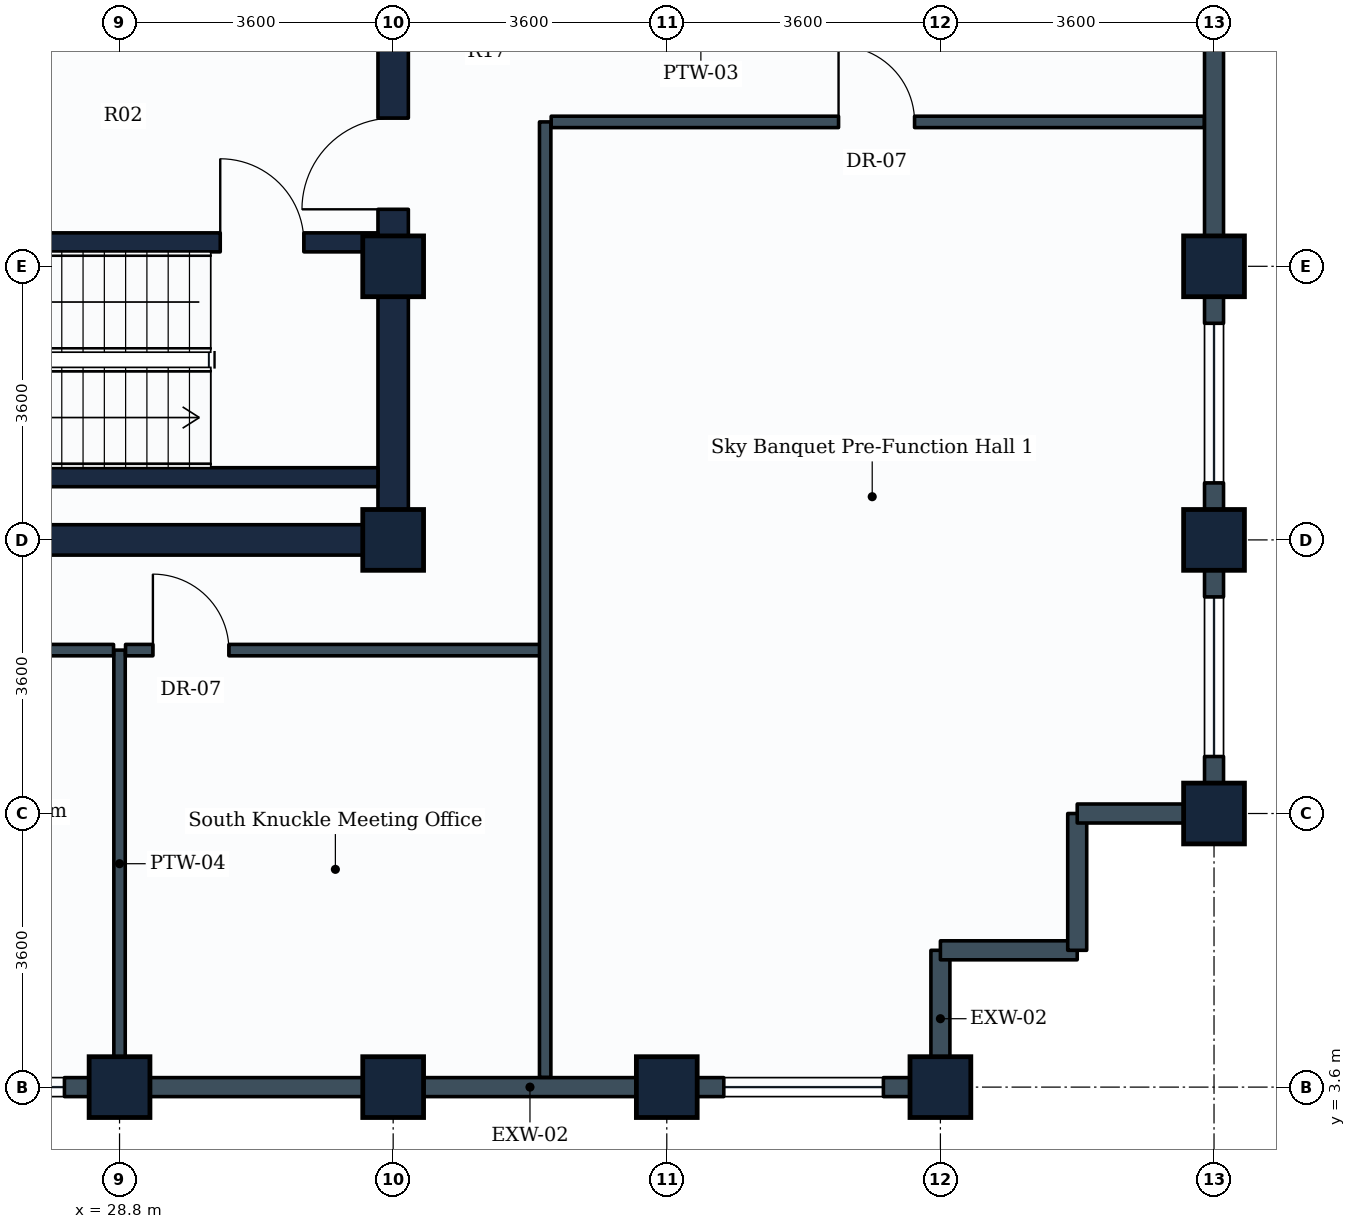
"""IFC4 building model, lengths in metres.
Left out: names, types, materials, properties, quantities, classifications, styles, units other than length and angle.
Written with IfcOpenShell. Run it as: python <this file> out.ifc"""

import sys

from ifc_helpers import new_model, si_unit, direction, frame, frame_2d, origin, origin_2d, place, context, subcontext, project, spatial, rectangle, extrude, element, fill, save


model = new_model("IFC4")
c1 = context("Model", 3, precision=1e-05, world=origin(), true_north=direction((0.0, 1.0)))
c2 = subcontext(c1, "Body", "Model", "MODEL_VIEW")
j1 = project(units=[si_unit("LENGTHUNIT", "METRE"), si_unit("PLANEANGLEUNIT", "RADIAN")], contexts=[c1])
p1 = place(None, origin())
s1 = spatial("IfcSite", under=j1, at=p1, CompositionType="ELEMENT")
p2 = place(p1, origin())
s2 = spatial("IfcBuilding", under=s1, at=p2, CompositionType="ELEMENT")
p3 = place(p2, frame((0.0, 0.0, 246.2)))
s3 = spatial("IfcBuildingStorey", under=s2, at=p3, CompositionType="ELEMENT", Elevation=246.2)
for number, where, z_axis, x_axis in (
    (1, (28.8, 3.6, 0.0), (0.0, 0.0, 1.0), (1.0, 0.0, 0.0)),
    (2, (32.4, 3.6, 0.0), (0.0, 0.0, 1.0), (1.0, 0.0, 0.0)),
    (3, (32.4, 10.8, 0.0), (0.0, 0.0, 1.0), (1.0, 0.0, 0.0)),
    (4, (32.4, 14.4, 0.0), (0.0, 0.0, 1.0), (1.0, 0.0, 0.0)),
    (5, (36.0, 3.6, 0.0), (0.0, 0.0, 1.0), (1.0, 0.0, 0.0)),
    (6, (39.6, 3.6, 0.0), (0.0, 0.0, 1.0), (1.0, 0.0, 0.0)),
    (7, (43.2, 7.2, 0.0), (0.0, 0.0, 1.0), (1.0, 0.0, 0.0)),
    (8, (43.2, 10.8, 0.0), (0.0, 0.0, 1.0), (0.0, 1.0, 0.0)),
    (9, (43.2, 14.4, 0.0), (0.0, 0.0, 1.0), (0.0, 1.0, 0.0)),
):
    element("IfcColumn", number, at=place(p3, frame(where, z_axis=z_axis, x_axis=x_axis)), inside=s3, PredefinedType="COLUMN", context=c2, shape_type="SweptSolid", body=[
        extrude(rectangle(XDim=0.8, YDim=0.8, at=origin_2d()), origin(), (0.0, 0.0, 1.0), 3.6),
    ])
p4 = place(p3, frame((28.8, 3.6, 0.0), z_axis=(0.0, 0.0, 1.0), x_axis=(-1.0, 0.0, 0.0)))
e10 = element("IfcWall", 10, at=p4, inside=s3, PredefinedType="STANDARD", context=c2, shape_type="SweptSolid", body=[
    extrude(rectangle(XDim=3.6, YDim=0.25, at=frame_2d((1.8, 0.0))), origin(), (0.0, 0.0, 1.0), 2.83),
])
p5 = place(p4, frame((0.725, 0.0, 0.85)))
e11 = element("IfcOpeningElement", 11, at=p5, cuts=e10, PredefinedType="OPENING", context=c2, shape_type="SweptSolid", body=[
    extrude(rectangle(XDim=2.1, YDim=1.35, at=frame_2d((1.05, 0.675))), frame((0.0, 0.135, 0.0), z_axis=(0.0, -1.0, 0.0), x_axis=(1.0, 0.0, 0.0)), (0.0, 0.0, 1.0), 0.27),
])
p6 = place(p3, frame((32.4, 3.6, 0.0), z_axis=(0.0, 0.0, 1.0), x_axis=(-1.0, 0.0, 0.0)))
e12 = element("IfcWall", 12, at=p6, inside=s3, PredefinedType="STANDARD", context=c2, shape_type="SweptSolid", body=[
    extrude(rectangle(XDim=3.6, YDim=0.25, at=frame_2d((1.8, 0.0))), origin(), (0.0, 0.0, 1.0), 2.83),
])
p7 = place(p3, frame((36.0, 3.6, 0.0), z_axis=(0.0, 0.0, 1.0), x_axis=(-1.0, 0.0, 0.0)))
e13 = element("IfcWall", 13, at=p7, inside=s3, PredefinedType="STANDARD", context=c2, shape_type="SweptSolid", body=[
    extrude(rectangle(XDim=3.6, YDim=0.25, at=frame_2d((1.8, 0.0))), origin(), (0.0, 0.0, 1.0), 3.265),
])
p8 = place(p3, frame((39.6, 3.6, 0.0), z_axis=(0.0, 0.0, 1.0), x_axis=(-1.0, 0.0, 0.0)))
e14 = element("IfcWall", 14, at=p8, inside=s3, PredefinedType="STANDARD", context=c2, shape_type="SweptSolid", body=[
    extrude(rectangle(XDim=3.6, YDim=0.25, at=frame_2d((1.8, 0.0))), origin(), (0.0, 0.0, 1.0), 3.265),
])
p9 = place(p8, frame((0.75, 0.0, 0.85)))
e15 = element("IfcOpeningElement", 15, at=p9, cuts=e14, PredefinedType="OPENING", context=c2, shape_type="SweptSolid", body=[
    extrude(rectangle(XDim=2.1, YDim=1.35, at=frame_2d((1.05, 0.675))), frame((0.0, 0.135, 0.0), z_axis=(0.0, -1.0, 0.0), x_axis=(1.0, 0.0, 0.0)), (0.0, 0.0, 1.0), 0.27),
])
for number, where, z_axis, x_axis in (
    (16, (39.6, 5.4, 0.0), (0.0, 0.0, 1.0), (0.0, -1.0, 0.0)),
    (17, (41.4, 5.4, 0.0), (0.0, 0.0, 1.0), (-1.0, 0.0, 0.0)),
):
    element("IfcWall", number, at=place(p3, frame(where, z_axis=z_axis, x_axis=x_axis)), inside=s3, PredefinedType="STANDARD", context=c2, shape_type="SweptSolid", body=[
        extrude(rectangle(XDim=1.8, YDim=0.25, at=frame_2d((0.9, 0.0))), origin(), (0.0, 0.0, 1.0), 3.265),
    ])
p10 = place(p3, frame((41.4, 7.2, 0.0), z_axis=(0.0, 0.0, 1.0), x_axis=(0.0, -1.0, 0.0)))
e18 = element("IfcWall", 18, at=p10, inside=s3, PredefinedType="STANDARD", context=c2, shape_type="SweptSolid", body=[
    extrude(rectangle(XDim=1.8, YDim=0.25, at=frame_2d((0.9, 0.0))), origin(), (0.0, 0.0, 1.0), 3.265),
])
p11 = place(p3, frame((43.2, 7.2, 0.0), z_axis=(0.0, 0.0, 1.0), x_axis=(-1.0, 0.0, 0.0)))
e19 = element("IfcWall", 19, at=p11, inside=s3, PredefinedType="STANDARD", context=c2, shape_type="SweptSolid", body=[
    extrude(rectangle(XDim=1.8, YDim=0.25, at=frame_2d((0.9, 0.0))), origin(), (0.0, 0.0, 1.0), 2.83),
])
p12 = place(p3, frame((43.2, 10.8, 0.0), z_axis=(0.0, 0.0, 1.0), x_axis=(0.0, -1.0, 0.0)))
e20 = element("IfcWall", 20, at=p12, inside=s3, PredefinedType="STANDARD", context=c2, shape_type="SweptSolid", body=[
    extrude(rectangle(XDim=3.6, YDim=0.25, at=frame_2d((1.8, 0.0))), origin(), (0.0, 0.0, 1.0), 2.83),
])
p13 = place(p12, frame((0.75, 0.0, 0.85)))
e21 = element("IfcOpeningElement", 21, at=p13, cuts=e20, PredefinedType="OPENING", context=c2, shape_type="SweptSolid", body=[
    extrude(rectangle(XDim=2.1, YDim=1.35, at=frame_2d((1.05, 0.675))), frame((0.0, 0.135, 0.0), z_axis=(0.0, -1.0, 0.0), x_axis=(1.0, 0.0, 0.0)), (0.0, 0.0, 1.0), 0.27),
])
p14 = place(p3, frame((43.2, 14.4, 0.0), z_axis=(0.0, 0.0, 1.0), x_axis=(0.0, -1.0, 0.0)))
e22 = element("IfcWall", 22, at=p14, inside=s3, PredefinedType="STANDARD", context=c2, shape_type="SweptSolid", body=[
    extrude(rectangle(XDim=3.6, YDim=0.25, at=frame_2d((1.8, 0.0))), origin(), (0.0, 0.0, 1.0), 2.83),
])
p15 = place(p14, frame((0.75, 0.0, 0.85)))
e23 = element("IfcOpeningElement", 23, at=p15, cuts=e22, PredefinedType="OPENING", context=c2, shape_type="SweptSolid", body=[
    extrude(rectangle(XDim=2.1, YDim=1.35, at=frame_2d((1.05, 0.675))), frame((0.0, 0.135, 0.0), z_axis=(0.0, -1.0, 0.0), x_axis=(1.0, 0.0, 0.0)), (0.0, 0.0, 1.0), 0.27),
])
p16 = place(p3, frame((43.2, 18.0, 0.0), z_axis=(0.0, 0.0, 1.0), x_axis=(0.0, -1.0, 0.0)))
e24 = element("IfcWall", 24, at=p16, inside=s3, PredefinedType="STANDARD", context=c2, shape_type="SweptSolid", body=[
    extrude(rectangle(XDim=3.6, YDim=0.25, at=frame_2d((1.8, 0.0))), origin(), (0.0, 0.0, 1.0), 2.83),
])
p17 = place(p3, frame((14.4, 10.8, 0.0), z_axis=(0.0, 0.0, 1.0), x_axis=(1.0, 0.0, 0.0)))
e25 = element("IfcWall", 25, at=p17, inside=s3, PredefinedType="SHEAR", context=c2, shape_type="SweptSolid", body=[
    extrude(rectangle(XDim=18.0, YDim=0.4, at=frame_2d((9.0, 0.0))), origin(), (0.0, 0.0, 1.0), 3.28),
])
p18 = place(p3, frame((32.4, 10.8, 0.0), z_axis=(0.0, 0.0, 1.0), x_axis=(0.0, 1.0, 0.0)))
e26 = element("IfcWall", 26, at=p18, inside=s3, PredefinedType="SHEAR", context=c2, shape_type="SweptSolid", body=[
    extrude(rectangle(XDim=14.4, YDim=0.4, at=frame_2d((7.2, 0.0))), origin(), (0.0, 0.0, 1.0), 3.28),
])
p19 = place(p18, frame((4.35, 0.0, 0.0)))
e27 = element("IfcOpeningElement", 27, at=p19, cuts=e26, PredefinedType="OPENING", context=c2, shape_type="SweptSolid", body=[
    extrude(rectangle(XDim=1.2, YDim=2.1, at=frame_2d((0.6, 1.05))), frame((0.0, 0.21, 0.0), z_axis=(0.0, -1.0, 0.0), x_axis=(1.0, 0.0, 0.0)), (0.0, 0.0, 1.0), 0.42),
])
p20 = place(p18, frame((10.0, 0.0, 0.0)))
e28 = element("IfcOpeningElement", 28, at=p20, cuts=e26, PredefinedType="OPENING", context=c2, shape_type="SweptSolid", body=[
    extrude(rectangle(XDim=1.2, YDim=2.1, at=frame_2d((0.6, 1.05))), frame((0.0, 0.21, 0.0), z_axis=(0.0, -1.0, 0.0), x_axis=(1.0, 0.0, 0.0)), (0.0, 0.0, 1.0), 0.42),
])
p21 = place(p3, frame((23.35, 11.625, 0.0), z_axis=(0.0, 0.0, 1.0), x_axis=(1.0, 0.0, 0.0)))
e29 = element("IfcWall", 29, at=p21, inside=s3, PredefinedType="SHEAR", context=c2, shape_type="SweptSolid", body=[
    extrude(rectangle(XDim=8.85, YDim=0.25, at=frame_2d((4.425, 0.0))), origin(), (0.0, 0.0, 1.0), 3.28),
])
p22 = place(p3, frame((23.35, 14.715, 0.0), z_axis=(0.0, 0.0, 1.0), x_axis=(1.0, 0.0, 0.0)))
e30 = element("IfcWall", 30, at=p22, inside=s3, PredefinedType="SHEAR", context=c2, shape_type="SweptSolid", body=[
    extrude(rectangle(XDim=8.85, YDim=0.25, at=frame_2d((4.425, 0.0))), origin(), (0.0, 0.0, 1.0), 3.28),
])
p23 = place(p22, frame((6.775, 0.0, 0.0)))
e31 = element("IfcOpeningElement", 31, at=p23, cuts=e30, PredefinedType="OPENING", context=c2, shape_type="SweptSolid", body=[
    extrude(rectangle(XDim=1.1, YDim=2.1, at=frame_2d((0.55, 1.05))), frame((0.0, 0.135, 0.0), z_axis=(0.0, -1.0, 0.0), x_axis=(1.0, 0.0, 0.0)), (0.0, 0.0, 1.0), 0.27),
])
p24 = place(p3, frame((28.8, 9.35, 0.0), z_axis=(0.0, 0.0, 1.0), x_axis=(0.0, -1.0, 0.0)))
e32 = element("IfcWall", 32, at=p24, inside=s3, PredefinedType="PARTITIONING", context=c2, shape_type="SweptSolid", body=[
    extrude(rectangle(XDim=5.621, YDim=0.15, at=frame_2d((2.811, 0.0))), origin(), (0.0, 0.0, 1.0), 3.265),
])
p25 = place(p3, frame((13.08, 9.35, 0.0), z_axis=(0.0, 0.0, 1.0), x_axis=(1.0, 0.0, 0.0)))
e33 = element("IfcWall", 33, at=p25, inside=s3, PredefinedType="PARTITIONING", context=c2, shape_type="SweptSolid", body=[
    extrude(rectangle(XDim=15.641, YDim=0.15, at=frame_2d((7.82, 0.0))), origin(), (0.0, 0.0, 1.0), 2.95),
])
p26 = place(p3, frame((28.879, 9.35, 0.0), z_axis=(0.0, 0.0, 1.0), x_axis=(1.0, 0.0, 0.0)))
e34 = element("IfcWall", 34, at=p26, inside=s3, PredefinedType="PARTITIONING", context=c2, shape_type="SweptSolid", body=[
    extrude(rectangle(XDim=5.521, YDim=0.15, at=frame_2d((2.76, 0.0))), origin(), (0.0, 0.0, 1.0), 3.265),
])
p27 = place(p26, frame((0.36, 0.0, 0.0)))
e35 = element("IfcOpeningElement", 35, at=p27, cuts=e34, PredefinedType="OPENING", context=c2, shape_type="SweptSolid", body=[
    extrude(rectangle(XDim=1.0, YDim=2.1, at=frame_2d((0.5, 1.05))), frame((0.0, 0.085, 0.0), z_axis=(0.0, -1.0, 0.0), x_axis=(1.0, 0.0, 0.0)), (0.0, 0.0, 1.0), 0.17),
])
p28 = place(p3, frame((34.4, 3.729, 0.0), z_axis=(0.0, 0.0, 1.0), x_axis=(0.0, 1.0, 0.0)))
e36 = element("IfcWall", 36, at=p28, inside=s3, PredefinedType="PARTITIONING", context=c2, shape_type="SweptSolid", body=[
    extrude(rectangle(XDim=12.571, YDim=0.15, at=frame_2d((6.286, 0.0))), origin(), (0.0, 0.0, 1.0), 3.265),
])
p29 = place(p3, frame((34.479, 16.3, 0.0), z_axis=(0.0, 0.0, 1.0), x_axis=(1.0, 0.0, 0.0)))
e37 = element("IfcWall", 37, at=p29, inside=s3, PredefinedType="PARTITIONING", context=c2, shape_type="SweptSolid", body=[
    extrude(rectangle(XDim=8.592, YDim=0.15, at=frame_2d((4.296, 0.0))), origin(), (0.0, 0.0, 1.0), 2.83),
])
p30 = place(p29, frame((3.781, 0.0, 0.0)))
e38 = element("IfcOpeningElement", 38, at=p30, cuts=e37, PredefinedType="OPENING", context=c2, shape_type="SweptSolid", body=[
    extrude(rectangle(XDim=1.0, YDim=2.1, at=frame_2d((0.5, 1.05))), frame((0.0, 0.085, 0.0), z_axis=(0.0, -1.0, 0.0), x_axis=(1.0, 0.0, 0.0)), (0.0, 0.0, 1.0), 0.17),
])
p31 = place(p5, origin())
e39 = element("IfcWindow", 39, at=p31, inside=s3, PartitioningType="SINGLE_PANEL", PredefinedType="WINDOW", context=c2, shape_type="SweptSolid", body=[
    extrude(rectangle(XDim=2.1, YDim=1.35, at=frame_2d((1.05, 0.675))), frame((0.0, 0.03, 0.0), z_axis=(0.0, -1.0, 0.0), x_axis=(1.0, 0.0, 0.0)), (0.0, 0.0, 1.0), 0.06),
])
fill(e11, e39)
p32 = place(p9, origin())
e40 = element("IfcWindow", 40, at=p32, inside=s3, PartitioningType="SINGLE_PANEL", PredefinedType="WINDOW", context=c2, shape_type="SweptSolid", body=[
    extrude(rectangle(XDim=2.1, YDim=1.35, at=frame_2d((1.05, 0.675))), frame((0.0, 0.03, 0.0), z_axis=(0.0, -1.0, 0.0), x_axis=(1.0, 0.0, 0.0)), (0.0, 0.0, 1.0), 0.06),
])
fill(e15, e40)
p33 = place(p13, origin())
e41 = element("IfcWindow", 41, at=p33, inside=s3, PartitioningType="SINGLE_PANEL", PredefinedType="WINDOW", context=c2, shape_type="SweptSolid", body=[
    extrude(rectangle(XDim=2.1, YDim=1.35, at=frame_2d((1.05, 0.675))), frame((0.0, 0.03, 0.0), z_axis=(0.0, -1.0, 0.0), x_axis=(1.0, 0.0, 0.0)), (0.0, 0.0, 1.0), 0.06),
])
fill(e21, e41)
p34 = place(p15, origin())
e42 = element("IfcWindow", 42, at=p34, inside=s3, PartitioningType="SINGLE_PANEL", PredefinedType="WINDOW", context=c2, shape_type="SweptSolid", body=[
    extrude(rectangle(XDim=2.1, YDim=1.35, at=frame_2d((1.05, 0.675))), frame((0.0, 0.03, 0.0), z_axis=(0.0, -1.0, 0.0), x_axis=(1.0, 0.0, 0.0)), (0.0, 0.0, 1.0), 0.06),
])
fill(e23, e42)
p35 = place(p23, origin())
e43 = element("IfcDoor", 43, at=p35, inside=s3, OperationType="SINGLE_SWING_LEFT", PredefinedType="DOOR", context=c2, shape_type="SweptSolid", body=[
    extrude(rectangle(XDim=1.1, YDim=2.1, at=frame_2d((0.55, 1.05))), frame((0.0, 0.025, 0.0), z_axis=(0.0, -1.0, 0.0), x_axis=(1.0, 0.0, 0.0)), (0.0, 0.0, 1.0), 0.05),
])
fill(e31, e43)
p36 = place(p19, origin())
e44 = element("IfcDoor", 44, at=p36, inside=s3, OperationType="SINGLE_SWING_LEFT", PredefinedType="DOOR", context=c2, shape_type="SweptSolid", body=[
    extrude(rectangle(XDim=1.2, YDim=2.1, at=frame_2d((0.6, 1.05))), frame((0.0, 0.025, 0.0), z_axis=(0.0, -1.0, 0.0), x_axis=(1.0, 0.0, 0.0)), (0.0, 0.0, 1.0), 0.05),
])
fill(e27, e44)
p37 = place(p27, origin())
e45 = element("IfcDoor", 45, at=p37, inside=s3, OperationType="SINGLE_SWING_LEFT", PredefinedType="DOOR", context=c2, shape_type="SweptSolid", body=[
    extrude(rectangle(XDim=1.0, YDim=2.1, at=frame_2d((0.5, 1.05))), frame((0.0, 0.025, 0.0), z_axis=(0.0, -1.0, 0.0), x_axis=(1.0, 0.0, 0.0)), (0.0, 0.0, 1.0), 0.05),
])
fill(e35, e45)
p38 = place(p30, origin())
e46 = element("IfcDoor", 46, at=p38, inside=s3, OperationType="SINGLE_SWING_LEFT", PredefinedType="DOOR", context=c2, shape_type="SweptSolid", body=[
    extrude(rectangle(XDim=1.0, YDim=2.1, at=frame_2d((0.5, 1.05))), frame((0.0, 0.025, 0.0), z_axis=(0.0, -1.0, 0.0), x_axis=(1.0, 0.0, 0.0)), (0.0, 0.0, 1.0), 0.05),
])
fill(e38, e46)
save(model, sys.argv[1])
